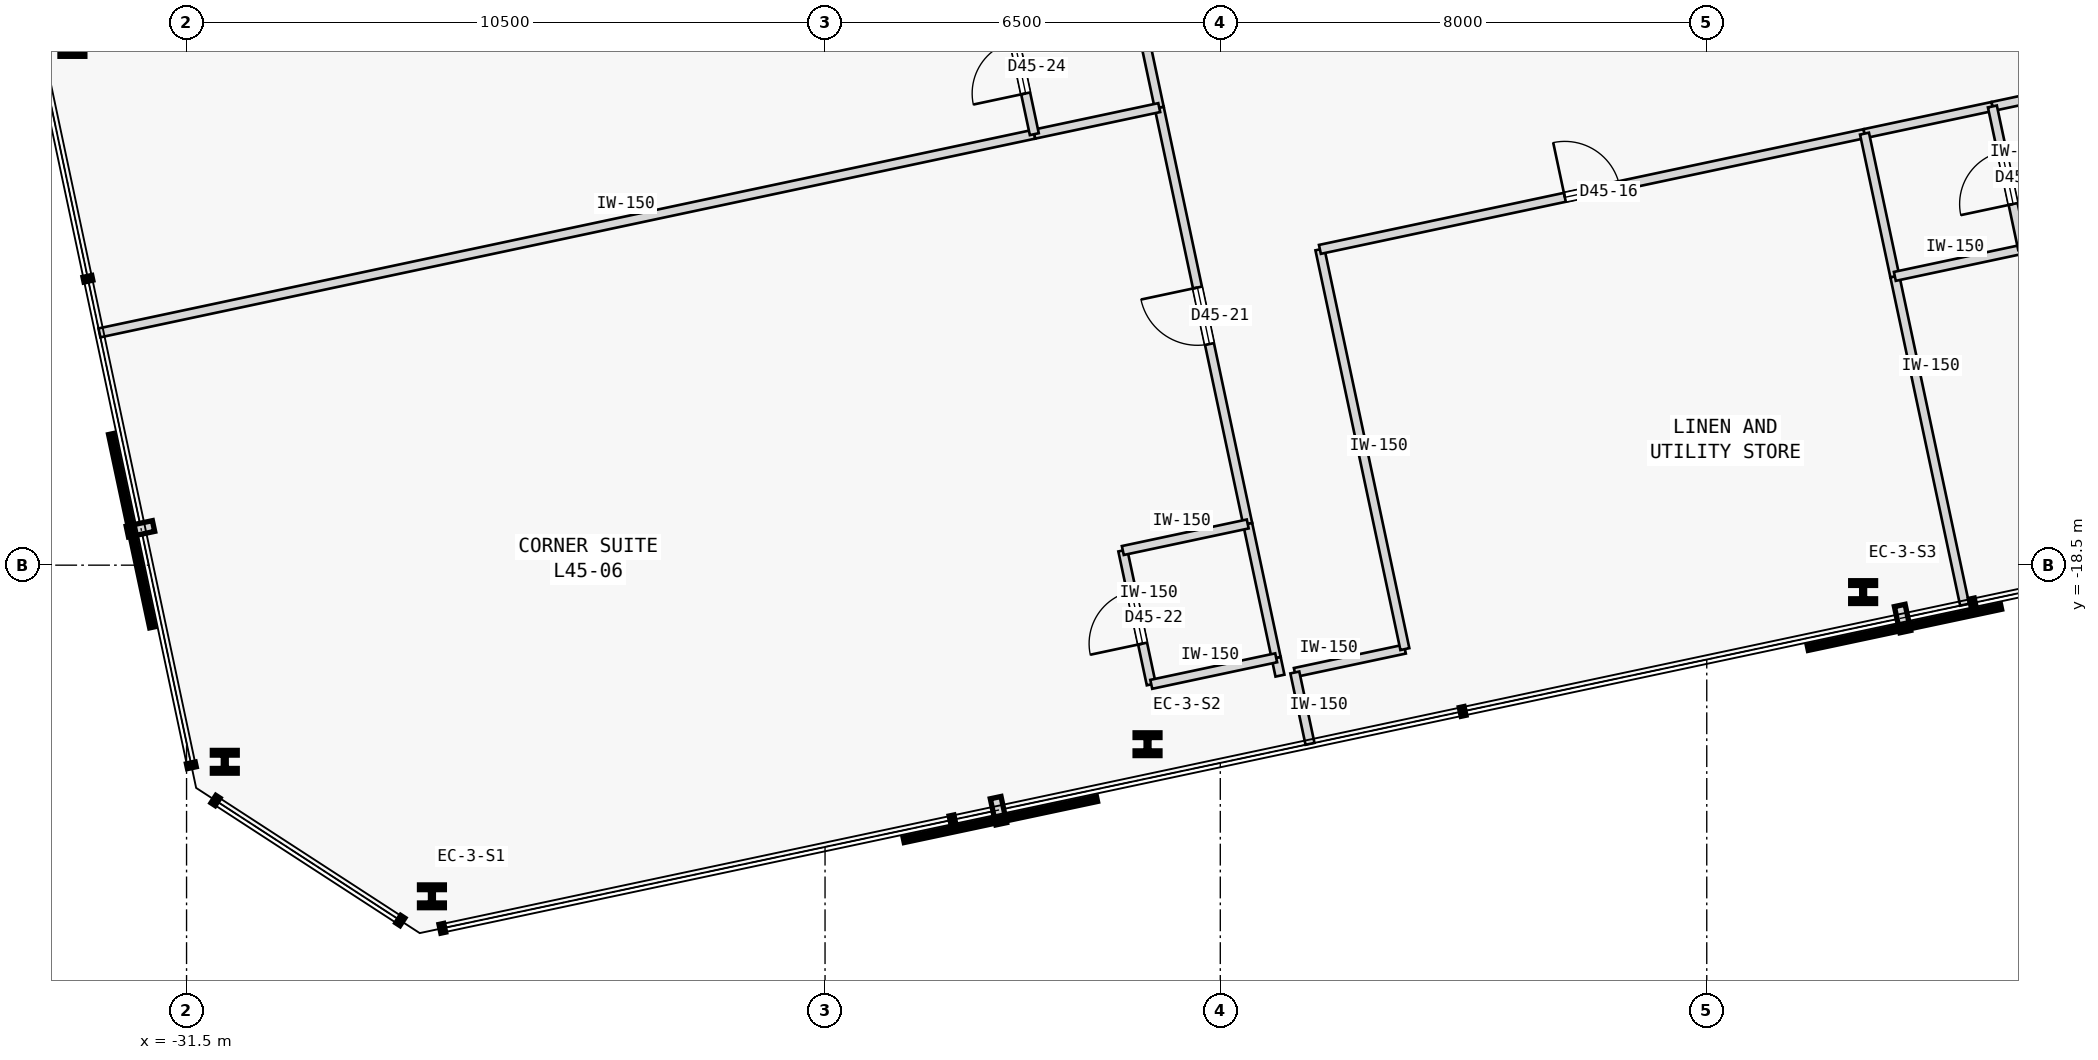
"""IFC4 building model, lengths in metres.
Left out: names, types, materials, properties, quantities, classifications, styles, units other than length and angle.
Written with IfcOpenShell. Run it as: python <this file> out.ifc"""

import sys

from ifc_helpers import new_model, si_unit, direction, frame, frame_2d, origin, origin_2d, place, context, subcontext, project, spatial, rectangle, i_section, extrude, element, fill, save


model = new_model("IFC4")
c1 = context("Model", 3, precision=1e-05, world=origin(), true_north=direction((0.0, 1.0)))
c2 = subcontext(c1, "Body", "Model", "MODEL_VIEW")
j1 = project(units=[si_unit("LENGTHUNIT", "METRE"), si_unit("PLANEANGLEUNIT", "RADIAN")], contexts=[c1])
p1 = place(None, origin())
s1 = spatial("IfcSite", under=j1, at=p1, CompositionType="ELEMENT")
p2 = place(p1, origin())
s2 = spatial("IfcBuilding", under=s1, at=p2, CompositionType="ELEMENT")
p3 = place(p2, frame((0.0, 0.0, 175.2)))
s3 = spatial("IfcBuildingStorey", under=s2, at=p3, CompositionType="ELEMENT", Elevation=175.2)
for number, where, z_axis, x_axis in (
    (1, (-27.465, -23.946, 0.0), (0.0, 0.0, 1.0), (1.0, 0.0, 0.0)),
    (2, (-15.697, -21.444, 0.0), (0.0, 0.0, 1.0), (1.0, 0.0, 0.0)),
    (3, (-3.928, -18.943, 0.0), (0.0, 0.0, 1.0), (1.0, 0.0, 0.0)),
    (4, (-33.377, -9.945, 0.0), (0.0, 0.0, 1.0), (1.0, 0.0, 0.0)),
    (5, (-30.871, -21.733, 0.0), (0.0, 0.0, 1.0), (1.0, 0.0, 0.0)),
):
    element("IfcColumn", number, at=place(p3, frame(where, z_axis=z_axis, x_axis=x_axis)), inside=s3, PredefinedType="COLUMN", context=c2, shape_type="SweptSolid", body=[
        extrude(i_section(OverallWidth=0.409, OverallDepth=0.374, WebThickness=0.048, FlangeThickness=0.077, FilletRadius=0.015, at=origin_2d()), origin(), (0.0, 0.0, 1.0), 3.4),
    ])
p4 = place(p3, frame((-13.274, -20.265, 0.0), z_axis=(0.0, 0.0, 1.0), x_axis=(0.978160192495, 0.207852442415, 0.0)))
e6 = element("IfcWall", 6, at=p4, inside=s3, PredefinedType="PARTITIONING", context=c2, shape_type="SweptSolid", body=[
    extrude(rectangle(XDim=1.85, YDim=0.15, at=frame_2d((0.925, 0.0))), origin(), (0.0, 0.0, 1.0), 3.175),
])
p5 = place(p3, frame((-11.465, -19.88, 0.0), z_axis=(0.0, 0.0, 1.0), x_axis=(-0.207916109912, 0.978146661416, 0.0)))
e7 = element("IfcWall", 7, at=p5, inside=s3, PredefinedType="PARTITIONING", context=c2, shape_type="SweptSolid", body=[
    extrude(rectangle(XDim=6.72, YDim=0.15, at=frame_2d((3.36, 0.0))), origin(), (0.0, 0.0, 1.0), 3.175),
])
p6 = place(p3, frame((-12.862, -13.307, 0.0), z_axis=(0.0, 0.0, 1.0), x_axis=(0.978149904805, 0.207900850719, 0.0)))
e8 = element("IfcWall", 8, at=p6, inside=s3, PredefinedType="PARTITIONING", context=c2, shape_type="SweptSolid", body=[
    extrude(rectangle(XDim=9.156, YDim=0.15, at=frame_2d((4.578, 0.0))), origin(), (0.0, 0.0, 1.0), 3.175),
])
p7 = place(p6, frame((4.118, 0.0, 0.0)))
e9 = element("IfcOpeningElement", 9, at=p7, cuts=e8, PredefinedType="OPENING", context=c2, shape_type="SweptSolid", body=[
    extrude(rectangle(XDim=0.92, YDim=2.15, at=frame_2d((0.46, 1.075))), frame((0.0, 0.085, 0.0), z_axis=(0.0, -1.0, 0.0), x_axis=(1.0, 0.0, 0.0)), (0.0, 0.0, 1.0), 0.17),
])
p8 = place(p3, frame((-1.803, -10.957, 0.0), z_axis=(0.0, 0.0, 1.0), x_axis=(0.978145386425, 0.207922108048, 0.0)))
e10 = element("IfcWall", 10, at=p8, inside=s3, PredefinedType="PARTITIONING", context=c2, shape_type="SweptSolid", body=[
    extrude(rectangle(XDim=10.232, YDim=0.15, at=frame_2d((5.116, 0.0))), origin(), (0.0, 0.0, 1.0), 3.175),
])
p9 = place(p8, frame((4.656, 0.0, 0.0)))
e11 = element("IfcOpeningElement", 11, at=p9, cuts=e10, PredefinedType="OPENING", context=c2, shape_type="SweptSolid", body=[
    extrude(rectangle(XDim=0.92, YDim=2.15, at=frame_2d((0.46, 1.075))), frame((0.0, 0.085, 0.0), z_axis=(0.0, -1.0, 0.0), x_axis=(1.0, 0.0, 0.0)), (0.0, 0.0, 1.0), 0.17),
])
p10 = place(p3, frame((-3.906, -11.404, 0.0), z_axis=(0.0, 0.0, 1.0), x_axis=(0.978146728319, 0.207915795165, 0.0)))
e12 = element("IfcWall", 12, at=p10, inside=s3, PredefinedType="PARTITIONING", context=c2, shape_type="SweptSolid", body=[
    extrude(rectangle(XDim=2.15, YDim=0.15, at=frame_2d((1.075, 0.0))), origin(), (0.0, 0.0, 1.0), 3.175),
])
p11 = place(p3, frame((-13.519, -20.317, 0.0), z_axis=(0.0, 0.0, 1.0), x_axis=(-0.207527808066, 0.978229118806, 0.0)))
e13 = element("IfcWall", 13, at=p11, inside=s3, PredefinedType="PARTITIONING", context=c2, shape_type="SweptSolid", body=[
    extrude(rectangle(XDim=0.3, YDim=0.15, at=frame_2d((0.15, 0.0))), origin(), (0.0, 0.0, 1.0), 3.175),
])
p12 = place(p3, frame((-14.049, -17.823, 0.0), z_axis=(0.0, 0.0, 1.0), x_axis=(-0.207940096132, 0.978141562567, 0.0)))
e14 = element("IfcWall", 14, at=p12, inside=s3, PredefinedType="PARTITIONING", context=c2, shape_type="SweptSolid", body=[
    extrude(rectangle(XDim=7.0, YDim=0.15, at=frame_2d((3.5, 0.0))), origin(), (0.0, 0.0, 1.0), 3.175),
])
p13 = place(p12, frame((3.025, 0.0, 0.0)))
e15 = element("IfcOpeningElement", 15, at=p13, cuts=e14, PredefinedType="OPENING", context=c2, shape_type="SweptSolid", body=[
    extrude(rectangle(XDim=0.95, YDim=2.15, at=frame_2d((0.475, 1.075))), frame((0.0, 0.085, 0.0), z_axis=(0.0, -1.0, 0.0), x_axis=(1.0, 0.0, 0.0)), (0.0, 0.0, 1.0), 0.17),
])
for number, where, z_axis, x_axis in (
    (16, (-13.581, -20.023, 0.0), (0.0, 0.0, 1.0), (-0.208, 0.978, 0.0)),
    (17, (-15.504, -10.976, 0.0), (0.0, 0.0, 1.0), (-0.208, 0.978, 0.0)),
):
    element("IfcWall", number, at=place(p3, frame(where, z_axis=z_axis, x_axis=x_axis)), inside=s3, PredefinedType="PARTITIONING", context=c2, shape_type="SweptSolid", body=[
        extrude(rectangle(XDim=2.25, YDim=0.15, at=frame_2d((1.125, 0.0))), origin(), (0.0, 0.0, 1.0), 3.175),
    ])
p14 = place(p3, frame((-2.259, -19.15, 0.0), z_axis=(0.0, 0.0, 1.0), x_axis=(-0.20791588359, 0.978146709523, 0.0)))
e18 = element("IfcWall", 18, at=p14, inside=s3, PredefinedType="PARTITIONING", context=c2, shape_type="SweptSolid", body=[
    extrude(rectangle(XDim=5.52, YDim=0.15, at=frame_2d((2.76, 0.0))), origin(), (0.0, 0.0, 1.0), 3.175),
])
p15 = place(p3, frame((-3.407, -13.751, 0.0), z_axis=(0.0, 0.0, 1.0), x_axis=(-0.207840504985, 0.978162729042, 0.0)))
e19 = element("IfcWall", 19, at=p15, inside=s3, PredefinedType="PARTITIONING", context=c2, shape_type="SweptSolid", body=[
    extrude(rectangle(XDim=2.4, YDim=0.15, at=frame_2d((1.2, 0.0))), origin(), (0.0, 0.0, 1.0), 3.175),
])
p16 = place(p3, frame((-13.025, -21.439, 0.0), z_axis=(0.0, 0.0, 1.0), x_axis=(-0.207917150959, 0.978146440129, 0.0)))
e20 = element("IfcWall", 20, at=p16, inside=s3, PredefinedType="PARTITIONING", context=c2, shape_type="SweptSolid", body=[
    extrude(rectangle(XDim=1.2, YDim=0.15, at=frame_2d((0.6, 0.0))), origin(), (0.0, 0.0, 1.0), 3.175),
])
p17 = place(p3, frame((-3.407, -13.751, 0.0), z_axis=(0.0, 0.0, 1.0), x_axis=(0.978151636287, 0.207892704126, 0.0)))
e21 = element("IfcWall", 21, at=p17, inside=s3, PredefinedType="PARTITIONING", context=c2, shape_type="SweptSolid", body=[
    extrude(rectangle(XDim=2.15, YDim=0.15, at=frame_2d((1.075, 0.0))), origin(), (0.0, 0.0, 1.0), 3.175),
])
p18 = place(p3, frame((-1.304, -13.304, 0.0), z_axis=(0.0, 0.0, 1.0), x_axis=(-0.207937840262, 0.978142042133, 0.0)))
e22 = element("IfcWall", 22, at=p18, inside=s3, PredefinedType="PARTITIONING", context=c2, shape_type="SweptSolid", body=[
    extrude(rectangle(XDim=2.4, YDim=0.15, at=frame_2d((1.2, 0.0))), origin(), (0.0, 0.0, 1.0), 3.175),
])
p19 = place(p18, frame((0.76, 0.0, 0.0)))
e23 = element("IfcOpeningElement", 23, at=p19, cuts=e22, PredefinedType="OPENING", context=c2, shape_type="SweptSolid", body=[
    extrude(rectangle(XDim=0.88, YDim=2.15, at=frame_2d((0.44, 1.075))), frame((0.0, 0.085, 0.0), z_axis=(0.0, -1.0, 0.0), x_axis=(1.0, 0.0, 0.0)), (0.0, 0.0, 1.0), 0.17),
])
p20 = place(p3, frame((-15.635, -20.46, 0.0), z_axis=(0.0, 0.0, 1.0), x_axis=(-0.207913264065, 0.978147266328, 0.0)))
e24 = element("IfcWall", 24, at=p20, inside=s3, PredefinedType="PARTITIONING", context=c2, shape_type="SweptSolid", body=[
    extrude(rectangle(XDim=2.25, YDim=0.15, at=frame_2d((1.125, 0.0))), origin(), (0.0, 0.0, 1.0), 3.175),
])
p21 = place(p20, frame((0.685, 0.0, 0.0)))
e25 = element("IfcOpeningElement", 25, at=p21, cuts=e24, PredefinedType="OPENING", context=c2, shape_type="SweptSolid", body=[
    extrude(rectangle(XDim=0.88, YDim=2.15, at=frame_2d((0.44, 1.075))), frame((0.0, 0.085, 0.0), z_axis=(0.0, -1.0, 0.0), x_axis=(1.0, 0.0, 0.0)), (0.0, 0.0, 1.0), 0.17),
])
for number, where, z_axis, x_axis in (
    (26, (-15.635, -20.46, 0.0), (0.0, 0.0, 1.0), (0.978, 0.208, 0.0)),
    (27, (-16.103, -18.259, 0.0), (0.0, 0.0, 1.0), (0.978, 0.208, 0.0)),
):
    element("IfcWall", number, at=place(p3, frame(where, z_axis=z_axis, x_axis=x_axis)), inside=s3, PredefinedType="PARTITIONING", context=c2, shape_type="SweptSolid", body=[
        extrude(rectangle(XDim=2.1, YDim=0.15, at=frame_2d((1.05, 0.0))), origin(), (0.0, 0.0, 1.0), 3.175),
    ])
p22 = place(p3, frame((-32.933, -14.68, 0.0), z_axis=(0.0, 0.0, 1.0), x_axis=(0.978146137903, 0.207918572776, 0.0)))
e28 = element("IfcWall", 28, at=p22, inside=s3, PredefinedType="PARTITIONING", context=c2, shape_type="SweptSolid", body=[
    extrude(rectangle(XDim=15.718, YDim=0.15, at=frame_2d((7.859, 0.0))), origin(), (0.0, 0.0, 1.0), 3.175),
])
p23 = place(p3, frame((-17.558, -11.412, 0.0), z_axis=(0.0, 0.0, 1.0), x_axis=(0.978153236239, 0.207885176084, 0.0)))
e29 = element("IfcWall", 29, at=p23, inside=s3, PredefinedType="PARTITIONING", context=c2, shape_type="SweptSolid", body=[
    extrude(rectangle(XDim=2.1, YDim=0.15, at=frame_2d((1.05, 0.0))), origin(), (0.0, 0.0, 1.0), 3.175),
])
p24 = place(p3, frame((-17.558, -11.412, 0.0), z_axis=(0.0, 0.0, 1.0), x_axis=(-0.207891197838, 0.978151956427, 0.0)))
e30 = element("IfcWall", 30, at=p24, inside=s3, PredefinedType="PARTITIONING", context=c2, shape_type="SweptSolid", body=[
    extrude(rectangle(XDim=2.25, YDim=0.15, at=frame_2d((1.125, 0.0))), origin(), (0.0, 0.0, 1.0), 3.175),
])
p25 = place(p24, frame((0.685, 0.0, 0.0)))
e31 = element("IfcOpeningElement", 31, at=p25, cuts=e30, PredefinedType="OPENING", context=c2, shape_type="SweptSolid", body=[
    extrude(rectangle(XDim=0.88, YDim=2.15, at=frame_2d((0.44, 1.075))), frame((0.0, 0.085, 0.0), z_axis=(0.0, -1.0, 0.0), x_axis=(1.0, 0.0, 0.0)), (0.0, 0.0, 1.0), 0.17),
])
p26 = place(p7, origin())
e32 = element("IfcDoor", 32, at=p26, inside=s3, OperationType="SINGLE_SWING_LEFT", PredefinedType="DOOR", context=c2, shape_type="SweptSolid", body=[
    extrude(rectangle(XDim=0.92, YDim=2.15, at=frame_2d((0.46, 1.075))), frame((0.0, 0.025, 0.0), z_axis=(0.0, -1.0, 0.0), x_axis=(1.0, 0.0, 0.0)), (0.0, 0.0, 1.0), 0.05),
])
fill(e9, e32)
p27 = place(p19, origin())
e33 = element("IfcDoor", 33, at=p27, inside=s3, OperationType="SINGLE_SWING_LEFT", PredefinedType="DOOR", context=c2, shape_type="SweptSolid", body=[
    extrude(rectangle(XDim=0.88, YDim=2.15, at=frame_2d((0.44, 1.075))), frame((0.0, 0.025, 0.0), z_axis=(0.0, -1.0, 0.0), x_axis=(1.0, 0.0, 0.0)), (0.0, 0.0, 1.0), 0.05),
])
fill(e23, e33)
p28 = place(p13, origin())
e34 = element("IfcDoor", 34, at=p28, inside=s3, OperationType="SINGLE_SWING_RIGHT", PredefinedType="DOOR", context=c2, shape_type="SweptSolid", body=[
    extrude(rectangle(XDim=0.95, YDim=2.15, at=frame_2d((0.475, 1.075))), frame((0.0, 0.025, 0.0), z_axis=(0.0, -1.0, 0.0), x_axis=(1.0, 0.0, 0.0)), (0.0, 0.0, 1.0), 0.05),
])
fill(e15, e34)
p29 = place(p21, origin())
e35 = element("IfcDoor", 35, at=p29, inside=s3, OperationType="SINGLE_SWING_LEFT", PredefinedType="DOOR", context=c2, shape_type="SweptSolid", body=[
    extrude(rectangle(XDim=0.88, YDim=2.15, at=frame_2d((0.44, 1.075))), frame((0.0, 0.025, 0.0), z_axis=(0.0, -1.0, 0.0), x_axis=(1.0, 0.0, 0.0)), (0.0, 0.0, 1.0), 0.05),
])
fill(e25, e35)
p30 = place(p25, origin())
e36 = element("IfcDoor", 36, at=p30, inside=s3, OperationType="SINGLE_SWING_LEFT", PredefinedType="DOOR", context=c2, shape_type="SweptSolid", body=[
    extrude(rectangle(XDim=0.88, YDim=2.15, at=frame_2d((0.44, 1.075))), frame((0.0, 0.025, 0.0), z_axis=(0.0, -1.0, 0.0), x_axis=(1.0, 0.0, 0.0)), (0.0, 0.0, 1.0), 0.05),
])
fill(e31, e36)
save(model, sys.argv[1])
